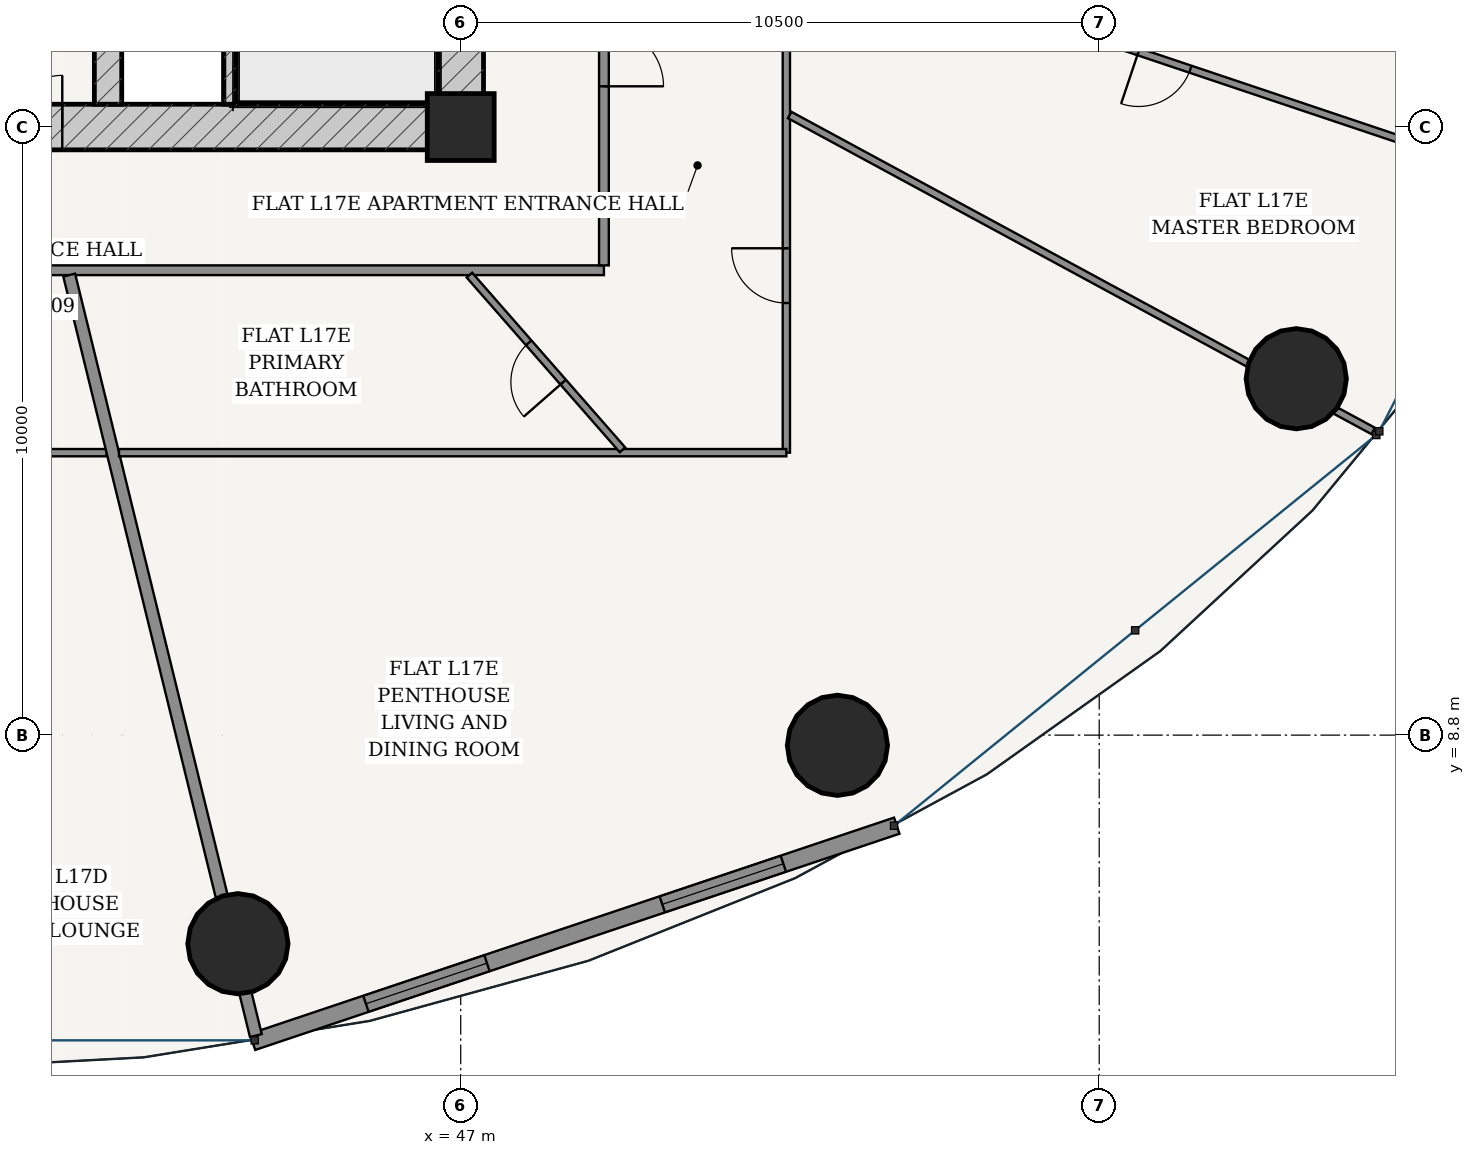
"""IFC4 building model, lengths in metres.
Left out: names, types, materials, properties, quantities, classifications, styles, units other than length and angle.
Written with IfcOpenShell. Run it as: python <this file> out.ifc"""

import sys

from ifc_helpers import new_model, si_unit, direction, frame, frame_2d, origin, origin_2d, place, context, subcontext, project, spatial, rectangle, hollow_circle, extrude, source, transform, mapped, element, fill, save


model = new_model("IFC4")
c1 = context("Model", 3, precision=1e-05, world=origin(), true_north=direction((-0.2419218956, 0.970295726276)))
c2 = subcontext(c1, "Body", "Model", "MODEL_VIEW")
j1 = project(units=[si_unit("LENGTHUNIT", "METRE"), si_unit("PLANEANGLEUNIT", "RADIAN")], contexts=[c1])
p1 = place(None, origin())
s1 = spatial("IfcSite", under=j1, at=p1, CompositionType="ELEMENT")
p2 = place(p1, origin())
s2 = spatial("IfcBuilding", under=s1, at=p2, CompositionType="ELEMENT")
p3 = place(p2, frame((0.0, 0.0, 67.2)))
s3 = spatial("IfcBuildingStorey", under=s2, at=p3, CompositionType="ELEMENT", Elevation=67.2)
p4 = place(p3, frame((47.0, 18.8, 0.0), z_axis=(0.0, 0.0, 1.0), x_axis=(1.0, 0.0, 0.0)))
e1 = element("IfcColumn", 1, at=p4, inside=s3, PredefinedType="COLUMN", context=c2, shape_type="SweptSolid", body=[
    extrude(rectangle(XDim=1.1, YDim=1.1, at=origin_2d()), origin(), (0.0, 0.0, 1.0), 3.6),
])
p5 = place(p3, frame((28.625, 18.8, 0.0), z_axis=(0.0, 0.0, 1.0), x_axis=(1.0, 0.0, 0.0)))
e2 = element("IfcWall", 2, at=p5, inside=s3, PredefinedType="SHEAR", context=c2, shape_type="SweptSolid", body=[
    extrude(rectangle(XDim=18.75, YDim=0.75, at=frame_2d((9.375, 0.0))), origin(), (0.0, 0.0, 1.0), 3.32),
])
p6 = place(p5, frame((6.927, 0.0, 0.0)))
e3 = element("IfcOpeningElement", 3, at=p6, cuts=e2, PredefinedType="OPENING", context=c2, shape_type="SweptSolid", body=[
    extrude(rectangle(XDim=0.85, YDim=2.1, at=frame_2d((0.425, 1.05))), frame((0.0, 0.385, 0.0), z_axis=(0.0, -1.0, 0.0), x_axis=(1.0, 0.0, 0.0)), (0.0, 0.0, 1.0), 0.77),
])
p7 = place(p5, frame((8.95, 0.0, 0.0)))
e4 = element("IfcOpeningElement", 4, at=p7, cuts=e2, PredefinedType="OPENING", context=c2, shape_type="SweptSolid", body=[
    extrude(rectangle(XDim=0.85, YDim=2.1, at=frame_2d((0.425, 1.05))), frame((0.0, 0.385, 0.0), z_axis=(0.0, -1.0, 0.0), x_axis=(1.0, 0.0, 0.0)), (0.0, 0.0, 1.0), 0.77),
])
p8 = place(p5, frame((10.972, 0.0, 0.0)))
e5 = element("IfcOpeningElement", 5, at=p8, cuts=e2, PredefinedType="OPENING", context=c2, shape_type="SweptSolid", body=[
    extrude(rectangle(XDim=0.85, YDim=2.1, at=frame_2d((0.425, 1.05))), frame((0.0, 0.385, 0.0), z_axis=(0.0, -1.0, 0.0), x_axis=(1.0, 0.0, 0.0)), (0.0, 0.0, 1.0), 0.77),
])
p9 = place(p3, frame((47.0, 19.175, 0.0), z_axis=(0.0, 0.0, 1.0), x_axis=(0.0, 1.0, 0.0)))
e6 = element("IfcWall", 6, at=p9, inside=s3, PredefinedType="SHEAR", context=c2, shape_type="SweptSolid", body=[
    extrude(rectangle(XDim=15.25, YDim=0.75, at=frame_2d((7.625, 0.0))), origin(), (0.0, 0.0, 1.0), 3.32),
])
p10 = place(p9, frame((9.875, 0.0, 0.0)))
e7 = element("IfcOpeningElement", 7, at=p10, cuts=e6, PredefinedType="OPENING", context=c2, shape_type="SweptSolid", body=[
    extrude(rectangle(XDim=1.5, YDim=2.2, at=frame_2d((0.75, 1.1))), frame((0.0, 0.385, 0.0), z_axis=(0.0, -1.0, 0.0), x_axis=(1.0, 0.0, 0.0)), (0.0, 0.0, 1.0), 0.77),
])
p11 = place(p3, frame((43.205, 19.175, 0.0), z_axis=(0.0, 0.0, 1.0), x_axis=(0.0, 1.0, 0.0)))
e8 = element("IfcWall", 8, at=p11, inside=s3, PredefinedType="SOLIDWALL", context=c2, shape_type="SweptSolid", body=[
    extrude(rectangle(XDim=7.375, YDim=0.2, at=frame_2d((3.688, 0.0))), origin(), (0.0, 0.0, 1.0), 3.32),
])
p12 = place(p3, frame((41.2, 19.175, 0.0), z_axis=(0.0, 0.0, 1.0), x_axis=(0.0, 1.0, 0.0)))
e9 = element("IfcWall", 9, at=p12, inside=s3, PredefinedType="SHEAR", context=c2, shape_type="SweptSolid", body=[
    extrude(rectangle(XDim=15.25, YDim=0.45, at=frame_2d((7.625, 0.0))), origin(), (0.0, 0.0, 1.0), 3.32),
])
p13 = place(p12, frame((7.8, 0.0, 0.0)))
e10 = element("IfcOpeningElement", 10, at=p13, cuts=e9, PredefinedType="OPENING", context=c2, shape_type="SweptSolid", body=[
    extrude(rectangle(XDim=1.05, YDim=2.15, at=frame_2d((0.525, 1.075))), frame((0.0, 0.235, 0.0), z_axis=(0.0, -1.0, 0.0), x_axis=(1.0, 0.0, 0.0)), (0.0, 0.0, 1.0), 0.47),
])
for number, where, z_axis, x_axis in (
    (11, (43.336, 5.37, 0.0), (0.0, 0.0, 1.0), (1.0, 0.0, 0.0)),
    (12, (53.195, 8.632, 0.0), (0.0, 0.0, 1.0), (1.0, 0.0, 0.0)),
    (13, (60.741, 14.661, 0.0), (0.0, 0.0, 1.0), (1.0, 0.0, 0.0)),
):
    element("IfcColumn", number, at=place(p3, frame(where, z_axis=z_axis, x_axis=x_axis)), inside=s3, PredefinedType="COLUMN", context=c2, shape_type="SweptSolid", body=[
        extrude(hollow_circle(Radius=0.825, WallThickness=0.05, at=origin_2d()), origin(), (0.0, 0.0, 1.0), 3.6),
    ])
p14 = place(p3, frame((43.576, 3.756, 0.0), z_axis=(0.0, 0.0, 1.0), x_axis=(0.948047847546, 0.31812777113, 0.0)))
e14 = element("IfcWall", 14, at=p14, inside=s3, PredefinedType="SOLIDWALL", context=c2, shape_type="SweptSolid", body=[
    extrude(rectangle(XDim=11.175, YDim=0.28, at=frame_2d((5.588, 0.0))), origin(), (0.0, 0.0, 1.0), 3.32),
])
p15 = place(p14, frame((1.967, 0.0, 0.85)))
e15 = element("IfcOpeningElement", 15, at=p15, cuts=e14, PredefinedType="OPENING", context=c2, shape_type="SweptSolid", body=[
    extrude(rectangle(XDim=2.1, YDim=1.95, at=frame_2d((1.05, 0.975))), frame((0.0, 0.15, 0.0), z_axis=(0.0, -1.0, 0.0), x_axis=(1.0, 0.0, 0.0)), (0.0, 0.0, 1.0), 0.3),
])
p16 = place(p14, frame((7.108, 0.0, 0.85)))
e16 = element("IfcOpeningElement", 16, at=p16, cuts=e14, PredefinedType="OPENING", context=c2, shape_type="SweptSolid", body=[
    extrude(rectangle(XDim=2.1, YDim=1.95, at=frame_2d((1.05, 0.975))), frame((0.0, 0.15, 0.0), z_axis=(0.0, -1.0, 0.0), x_axis=(1.0, 0.0, 0.0)), (0.0, 0.0, 1.0), 0.3),
])
p17 = place(p3, frame((26.645, 16.445, 0.0), z_axis=(0.0, 0.0, 1.0), x_axis=(1.0, 0.0, 0.0)))
e17 = element("IfcWall", 17, at=p17, inside=s3, PredefinedType="PARTITIONING", context=c2, shape_type="SweptSolid", body=[
    extrude(rectangle(XDim=22.71, YDim=0.16, at=frame_2d((11.355, 0.0))), origin(), (0.0, 0.0, 1.0), 2.688),
])
p18 = place(p17, frame((5.419, 0.0, 0.0)))
e18 = element("IfcOpeningElement", 18, at=p18, cuts=e17, PredefinedType="OPENING", context=c2, shape_type="SweptSolid", body=[
    extrude(rectangle(XDim=0.98, YDim=2.2, at=frame_2d((0.49, 1.1))), frame((0.0, 0.09, 0.0), z_axis=(0.0, -1.0, 0.0), x_axis=(1.0, 0.0, 0.0)), (0.0, 0.0, 1.0), 0.18),
])
p19 = place(p3, frame((49.355, 16.525, 0.0), z_axis=(0.0, 0.0, 1.0), x_axis=(0.0, 1.0, 0.0)))
e19 = element("IfcWall", 19, at=p19, inside=s3, PredefinedType="PARTITIONING", context=c2, shape_type="SweptSolid", body=[
    extrude(rectangle(XDim=20.55, YDim=0.16, at=frame_2d((10.275, 0.0))), origin(), (0.0, 0.0, 1.0), 2.688),
])
p20 = place(p19, frame((16.537, 0.0, 0.0)))
e20 = element("IfcOpeningElement", 20, at=p20, cuts=e19, PredefinedType="OPENING", context=c2, shape_type="SweptSolid", body=[
    extrude(rectangle(XDim=0.98, YDim=2.2, at=frame_2d((0.49, 1.1))), frame((0.0, 0.09, 0.0), z_axis=(0.0, -1.0, 0.0), x_axis=(1.0, 0.0, 0.0)), (0.0, 0.0, 1.0), 0.18),
])
p21 = place(p19, frame((2.945, 0.0, 0.0)))
e21 = element("IfcOpeningElement", 21, at=p21, cuts=e19, PredefinedType="OPENING", context=c2, shape_type="SweptSolid", body=[
    extrude(rectangle(XDim=0.98, YDim=2.2, at=frame_2d((0.49, 1.1))), frame((0.0, 0.09, 0.0), z_axis=(0.0, -1.0, 0.0), x_axis=(1.0, 0.0, 0.0)), (0.0, 0.0, 1.0), 0.18),
])
p22 = place(p3, frame((41.176, 13.445, 0.0), z_axis=(0.0, 0.0, 1.0), x_axis=(-1.0, 0.0, 0.0)))
e22 = element("IfcWall", 22, at=p22, inside=s3, PredefinedType="PARTITIONING", context=c2, shape_type="SweptSolid", body=[
    extrude(rectangle(XDim=17.531, YDim=0.12, at=frame_2d((8.766, 0.0))), origin(), (0.0, 0.0, 1.0), 2.688),
])
p23 = place(p22, frame((10.299, 0.0, 0.0)))
e23 = element("IfcOpeningElement", 23, at=p23, cuts=e22, PredefinedType="OPENING", context=c2, shape_type="SweptSolid", body=[
    extrude(rectangle(XDim=0.9, YDim=2.15, at=frame_2d((0.45, 1.075))), frame((0.0, 0.07, 0.0), z_axis=(0.0, -1.0, 0.0), x_axis=(1.0, 0.0, 0.0)), (0.0, 0.0, 1.0), 0.14),
])
p24 = place(p22, frame((1.258, 0.0, 0.0)))
e24 = element("IfcOpeningElement", 24, at=p24, cuts=e22, PredefinedType="OPENING", context=c2, shape_type="SweptSolid", body=[
    extrude(rectangle(XDim=0.9, YDim=2.15, at=frame_2d((0.45, 1.075))), frame((0.0, 0.07, 0.0), z_axis=(0.0, -1.0, 0.0), x_axis=(1.0, 0.0, 0.0)), (0.0, 0.0, 1.0), 0.14),
])
p25 = place(p3, frame((40.562, 16.365, 0.0), z_axis=(0.0, 0.0, 1.0), x_axis=(0.238380116209, -0.971171931326, 0.0)))
e25 = element("IfcWall", 25, at=p25, inside=s3, PredefinedType="PARTITIONING", context=c2, shape_type="SweptSolid", body=[
    extrude(rectangle(XDim=12.877, YDim=0.2, at=frame_2d((6.438, 0.0))), origin(), (0.0, 0.0, 1.0), 2.688),
])
p26 = place(p3, frame((52.355, 26.698, 0.0), z_axis=(0.0, 0.0, 1.0), x_axis=(0.0, -1.0, 0.0)))
e26 = element("IfcWall", 26, at=p26, inside=s3, PredefinedType="PARTITIONING", context=c2, shape_type="SweptSolid", body=[
    extrude(rectangle(XDim=13.253, YDim=0.12, at=frame_2d((6.626, 0.0))), origin(), (0.0, 0.0, 1.0), 2.688),
])
p27 = place(p26, frame((9.892, 0.0, 0.0)))
e27 = element("IfcOpeningElement", 27, at=p27, cuts=e26, PredefinedType="OPENING", context=c2, shape_type="SweptSolid", body=[
    extrude(rectangle(XDim=0.9, YDim=2.15, at=frame_2d((0.45, 1.075))), frame((0.0, 0.07, 0.0), z_axis=(0.0, -1.0, 0.0), x_axis=(1.0, 0.0, 0.0)), (0.0, 0.0, 1.0), 0.14),
])
p28 = place(p26, frame((2.951, 0.0, 0.0)))
e28 = element("IfcOpeningElement", 28, at=p28, cuts=e26, PredefinedType="OPENING", context=c2, shape_type="SweptSolid", body=[
    extrude(rectangle(XDim=0.9, YDim=2.15, at=frame_2d((0.45, 1.075))), frame((0.0, 0.07, 0.0), z_axis=(0.0, -1.0, 0.0), x_axis=(1.0, 0.0, 0.0)), (0.0, 0.0, 1.0), 0.14),
])
p29 = place(p3, frame((52.355, 13.445, 0.0), z_axis=(0.0, 0.0, 1.0), x_axis=(-1.0, 0.0, 0.0)))
e29 = element("IfcWall", 29, at=p29, inside=s3, PredefinedType="PARTITIONING", context=c2, shape_type="SweptSolid", body=[
    extrude(rectangle(XDim=10.975, YDim=0.12, at=frame_2d((5.487, 0.0))), origin(), (0.0, 0.0, 1.0), 2.688),
])
p30 = place(p3, frame((52.409, 18.998, 0.0), z_axis=(0.0, 0.0, 1.0), x_axis=(0.879373936002, -0.476131789193, 0.0)))
e30 = element("IfcWall", 30, at=p30, inside=s3, PredefinedType="PARTITIONING", context=c2, shape_type="SweptSolid", body=[
    extrude(rectangle(XDim=10.913, YDim=0.12, at=frame_2d((5.456, 0.0))), origin(), (0.0, 0.0, 1.0), 2.688),
])
p31 = place(p3, frame((52.414, 21.962, 0.0), z_axis=(0.0, 0.0, 1.0), x_axis=(0.948021751459, -0.318205529118, 0.0)))
e31 = element("IfcWall", 31, at=p31, inside=s3, PredefinedType="PARTITIONING", context=c2, shape_type="SweptSolid", body=[
    extrude(rectangle(XDim=12.994, YDim=0.12, at=frame_2d((6.497, 0.0))), origin(), (0.0, 0.0, 1.0), 2.762),
])
p32 = place(p31, frame((6.047, 0.0, 0.0)))
e32 = element("IfcOpeningElement", 32, at=p32, cuts=e31, PredefinedType="OPENING", context=c2, shape_type="SweptSolid", body=[
    extrude(rectangle(XDim=0.9, YDim=2.15, at=frame_2d((0.45, 1.075))), frame((0.0, 0.07, 0.0), z_axis=(0.0, -1.0, 0.0), x_axis=(1.0, 0.0, 0.0)), (0.0, 0.0, 1.0), 0.14),
])
p33 = place(p3, frame((47.143, 16.365, 0.0), z_axis=(0.0, 0.0, 1.0), x_axis=(0.659015717138, -0.752129167474, 0.0)))
e33 = element("IfcWall", 33, at=p33, inside=s3, PredefinedType="PARTITIONING", context=c2, shape_type="SweptSolid", body=[
    extrude(rectangle(XDim=3.82, YDim=0.12, at=frame_2d((1.91, 0.0))), origin(), (0.0, 0.0, 1.0), 2.999),
])
p34 = place(p33, frame((1.48, 0.0, 0.0)))
e34 = element("IfcOpeningElement", 34, at=p34, cuts=e33, PredefinedType="OPENING", context=c2, shape_type="SweptSolid", body=[
    extrude(rectangle(XDim=0.86, YDim=2.15, at=frame_2d((0.43, 1.075))), frame((0.0, 0.07, 0.0), z_axis=(0.0, -1.0, 0.0), x_axis=(1.0, 0.0, 0.0)), (0.0, 0.0, 1.0), 0.14),
])
m1 = source(origin(), c2, "Body", "SweptSolid", [
    extrude(rectangle(XDim=2.1, YDim=1.95, at=frame_2d((1.05, 0.975))), frame((0.0, 0.03, 0.0), z_axis=(0.0, -1.0, 0.0), x_axis=(1.0, 0.0, 0.0)), (0.0, 0.0, 1.0), 0.06),
])
p35 = place(p15, origin())
e35 = element("IfcWindow", 35, at=p35, inside=s3, PartitioningType="SINGLE_PANEL", PredefinedType="WINDOW", context=c2, shape_type="MappedRepresentation", body=[
    mapped(m1, transform((0.0, 0.0, 0.0), scale=1.0)),
])
fill(e15, e35)
p36 = place(p16, origin())
e36 = element("IfcWindow", 36, at=p36, inside=s3, PartitioningType="SINGLE_PANEL", PredefinedType="WINDOW", context=c2, shape_type="MappedRepresentation", body=[
    mapped(m1, transform((0.0, 0.0, 0.0), scale=1.0)),
])
fill(e16, e36)
m2 = source(origin(), c2, "Body", "SweptSolid", [
    extrude(rectangle(XDim=0.85, YDim=2.1, at=frame_2d((0.425, 1.05))), frame((0.0, 0.025, 0.0), z_axis=(0.0, -1.0, 0.0), x_axis=(1.0, 0.0, 0.0)), (0.0, 0.0, 1.0), 0.05),
])
p37 = place(p8, origin())
e37 = element("IfcDoor", 37, at=p37, inside=s3, OperationType="SINGLE_SWING_RIGHT", PredefinedType="DOOR", context=c2, shape_type="MappedRepresentation", body=[
    mapped(m2, transform((0.0, 0.0, 0.0), scale=1.0)),
])
fill(e5, e37)
m3 = source(origin(), c2, "Body", "SweptSolid", [
    extrude(rectangle(XDim=0.98, YDim=2.2, at=frame_2d((0.49, 1.1))), frame((0.0, 0.025, 0.0), z_axis=(0.0, -1.0, 0.0), x_axis=(1.0, 0.0, 0.0)), (0.0, 0.0, 1.0), 0.05),
])
p38 = place(p21, frame((0.98, 0.0, 0.0), z_axis=(0.0, 0.0, 1.0), x_axis=(-1.0, 0.0, 0.0)))
e38 = element("IfcDoor", 38, at=p38, inside=s3, OperationType="SINGLE_SWING_RIGHT", PredefinedType="DOOR", context=c2, shape_type="MappedRepresentation", body=[
    mapped(m3, transform((0.0, 0.0, 0.0), scale=1.0)),
])
fill(e21, e38)
m4 = source(origin(), c2, "Body", "SweptSolid", [
    extrude(rectangle(XDim=0.86, YDim=2.15, at=frame_2d((0.43, 1.075))), frame((0.0, 0.025, 0.0), z_axis=(0.0, -1.0, 0.0), x_axis=(1.0, 0.0, 0.0)), (0.0, 0.0, 1.0), 0.05),
])
p39 = place(p34, frame((0.86, 0.0, 0.0), z_axis=(0.0, 0.0, 1.0), x_axis=(-1.0, 0.0, 0.0)))
e39 = element("IfcDoor", 39, at=p39, inside=s3, OperationType="SINGLE_SWING_LEFT", PredefinedType="DOOR", context=c2, shape_type="MappedRepresentation", body=[
    mapped(m4, transform((0.0, 0.0, 0.0), scale=1.0)),
])
fill(e34, e39)
m5 = source(origin(), c2, "Body", "SweptSolid", [
    extrude(rectangle(XDim=0.9, YDim=2.15, at=frame_2d((0.45, 1.075))), frame((0.0, 0.025, 0.0), z_axis=(0.0, -1.0, 0.0), x_axis=(1.0, 0.0, 0.0)), (0.0, 0.0, 1.0), 0.05),
])
p40 = place(p27, frame((0.9, 0.0, 0.0), z_axis=(0.0, 0.0, 1.0), x_axis=(-1.0, 0.0, 0.0)))
e40 = element("IfcDoor", 40, at=p40, inside=s3, OperationType="SINGLE_SWING_RIGHT", PredefinedType="DOOR", context=c2, shape_type="MappedRepresentation", body=[
    mapped(m5, transform((0.0, 0.0, 0.0), scale=1.0)),
])
fill(e27, e40)
p41 = place(p32, frame((0.9, 0.0, 0.0), z_axis=(0.0, 0.0, 1.0), x_axis=(-1.0, 0.0, 0.0)))
e41 = element("IfcDoor", 41, at=p41, inside=s3, OperationType="SINGLE_SWING_RIGHT", PredefinedType="DOOR", context=c2, shape_type="MappedRepresentation", body=[
    mapped(m5, transform((0.0, 0.0, 0.0), scale=1.0)),
])
fill(e32, e41)
save(model, sys.argv[1])
